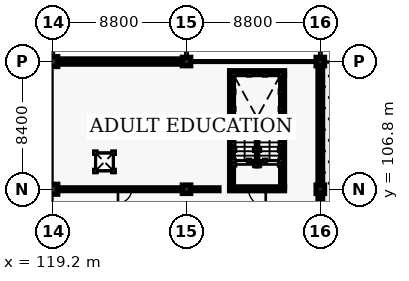
"""IFC4 building model, lengths in metres.
Left out: names, types, materials, properties, quantities, classifications, styles, units other than length and angle.
Written with IfcOpenShell. Run it as: python <this file> out.ifc"""

import sys

from ifc_helpers import new_model, si_unit, direction, frame, frame_2d, origin, origin_2d, place, context, subcontext, project, spatial, rectangle, extrude, element, fill, save


model = new_model("IFC4")
c1 = context("Model", 3, precision=1e-05, world=origin(), true_north=direction((0.0, 1.0)))
c2 = subcontext(c1, "Body", "Model", "MODEL_VIEW")
j1 = project(units=[si_unit("LENGTHUNIT", "METRE"), si_unit("PLANEANGLEUNIT", "RADIAN")], contexts=[c1])
p1 = place(None, origin())
s1 = spatial("IfcSite", under=j1, at=p1, CompositionType="ELEMENT")
p2 = place(p1, origin())
s2 = spatial("IfcBuilding", under=s1, at=p2, CompositionType="ELEMENT")
p3 = place(p2, frame((0.0, 0.0, 9.0)))
s3 = spatial("IfcBuildingStorey", under=s2, at=p3, CompositionType="ELEMENT", Elevation=9.0)
for number, where, z_axis, x_axis in (
    (1, (119.2, 106.8, 0.0), (0.0, 0.0, 1.0), (1.0, 0.0, 0.0)),
    (2, (119.2, 115.2, 0.0), (0.0, 0.0, 1.0), (1.0, 0.0, 0.0)),
):
    element("IfcColumn", number, at=place(p3, frame(where, z_axis=z_axis, x_axis=x_axis)), inside=s3, PredefinedType="COLUMN", context=c2, shape_type="SweptSolid", body=[
        extrude(rectangle(XDim=0.65, YDim=0.65, at=origin_2d()), origin(), (0.0, 0.0, 1.0), 3.9),
    ])
for number, where, z_axis, x_axis in (
    (3, (128.0, 106.8, 0.0), (0.0, 0.0, 1.0), (1.0, 0.0, 0.0)),
    (4, (128.0, 115.2, 0.0), (0.0, 0.0, 1.0), (1.0, 0.0, 0.0)),
    (5, (136.8, 106.8, 0.0), (0.0, 0.0, 1.0), (1.0, 0.0, 0.0)),
    (6, (136.8, 115.2, 0.0), (0.0, 0.0, 1.0), (1.0, 0.0, 0.0)),
):
    element("IfcColumn", number, at=place(p3, frame(where, z_axis=z_axis, x_axis=x_axis)), inside=s3, PredefinedType="COLUMN", context=c2, shape_type="SweptSolid", body=[
        extrude(rectangle(XDim=0.55, YDim=0.55, at=origin_2d()), origin(), (0.0, 0.0, 1.0), 3.9),
    ])
p4 = place(p3, frame((119.3, 115.2, 0.0), z_axis=(0.0, 0.0, 1.0), x_axis=(1.0, 0.0, 0.0)))
e7 = element("IfcWall", 7, at=p4, inside=s3, PredefinedType="SOLIDWALL", context=c2, shape_type="SweptSolid", body=[
    extrude(rectangle(XDim=8.6, YDim=0.34, at=frame_2d((4.3, 0.0))), origin(), (0.0, 0.0, 1.0), 2.845),
])
p5 = place(p3, frame((136.8, 98.5, 0.0), z_axis=(0.0, 0.0, 1.0), x_axis=(0.0, 1.0, 0.0)))
e8 = element("IfcWall", 8, at=p5, inside=s3, PredefinedType="SOLIDWALL", context=c2, shape_type="SweptSolid", body=[
    extrude(rectangle(XDim=8.2, YDim=0.3, at=frame_2d((4.1, 0.0))), origin(), (0.0, 0.0, 1.0), 3.195),
])
p6 = place(p3, frame((136.8, 106.9, 0.0), z_axis=(0.0, 0.0, 1.0), x_axis=(0.0, 1.0, 0.0)))
e9 = element("IfcWall", 9, at=p6, inside=s3, PredefinedType="SOLIDWALL", context=c2, shape_type="SweptSolid", body=[
    extrude(rectangle(XDim=8.2, YDim=0.3, at=frame_2d((4.1, 0.0))), origin(), (0.0, 0.0, 1.0), 3.195),
])
p7 = place(p3, frame((134.445, 106.83, 0.0), z_axis=(0.0, 0.0, 1.0), x_axis=(-1.0, 0.0, 0.0)))
e10 = element("IfcWall", 10, at=p7, inside=s3, PredefinedType="SHEAR", context=c2, shape_type="SweptSolid", body=[
    extrude(rectangle(XDim=3.61, YDim=0.25, at=frame_2d((1.805, 0.0))), origin(), (0.0, 0.0, 1.0), 3.66),
])
p8 = place(p7, frame((1.235, 0.0, 0.0)))
e11 = element("IfcOpeningElement", 11, at=p8, cuts=e10, PredefinedType="OPENING", context=c2, shape_type="SweptSolid", body=[
    extrude(rectangle(XDim=1.14, YDim=2.15, at=frame_2d((0.57, 1.075))), frame((0.0, 0.135, 0.0), z_axis=(0.0, -1.0, 0.0), x_axis=(1.0, 0.0, 0.0)), (0.0, 0.0, 1.0), 0.27),
])
p9 = place(p3, frame((130.835, 114.47, 0.0), z_axis=(0.0, 0.0, 1.0), x_axis=(1.0, 0.0, 0.0)))
e12 = element("IfcWall", 12, at=p9, inside=s3, PredefinedType="SHEAR", context=c2, shape_type="SweptSolid", body=[
    extrude(rectangle(XDim=3.61, YDim=0.25, at=frame_2d((1.805, 0.0))), origin(), (0.0, 0.0, 1.0), 3.66),
])
for number, where, z_axis, x_axis in (
    (13, (130.96, 106.955, 0.0), (0.0, 0.0, 1.0), (0.0, 1.0, 0.0)),
    (14, (134.32, 114.345, 0.0), (0.0, 0.0, 1.0), (0.0, -1.0, 0.0)),
):
    element("IfcWall", number, at=place(p3, frame(where, z_axis=z_axis, x_axis=x_axis)), inside=s3, PredefinedType="SHEAR", context=c2, shape_type="SweptSolid", body=[
        extrude(rectangle(XDim=7.39, YDim=0.25, at=frame_2d((3.695, 0.0))), origin(), (0.0, 0.0, 1.0), 3.66),
    ])
p10 = place(p3, frame((117.75, 106.8, 0.0), z_axis=(0.0, 0.0, 1.0), x_axis=(1.0, 0.0, 0.0)))
e15 = element("IfcWall", 15, at=p10, inside=s3, PredefinedType="PARTITIONING", context=c2, shape_type="SweptSolid", body=[
    extrude(rectangle(XDim=12.38, YDim=0.18, at=frame_2d((6.19, 0.0))), origin(), (0.0, 0.0, 1.0), 2.845),
])
p11 = place(p10, frame((5.74, 0.0, 0.0)))
e16 = element("IfcOpeningElement", 16, at=p11, cuts=e15, PredefinedType="OPENING", context=c2, shape_type="SweptSolid", body=[
    extrude(rectangle(XDim=0.9, YDim=2.06, at=frame_2d((0.45, 1.03))), frame((0.0, 0.1, 0.0), z_axis=(0.0, -1.0, 0.0), x_axis=(1.0, 0.0, 0.0)), (0.0, 0.0, 1.0), 0.2),
])
p12 = place(p8, origin())
e17 = element("IfcDoor", 17, at=p12, inside=s3, OperationType="SINGLE_SWING_LEFT", PredefinedType="DOOR", context=c2, shape_type="SweptSolid", body=[
    extrude(rectangle(XDim=1.14, YDim=2.15, at=frame_2d((0.57, 1.075))), frame((0.0, 0.025, 0.0), z_axis=(0.0, -1.0, 0.0), x_axis=(1.0, 0.0, 0.0)), (0.0, 0.0, 1.0), 0.05),
])
fill(e11, e17)
p13 = place(p11, origin())
e18 = element("IfcDoor", 18, at=p13, inside=s3, OperationType="SINGLE_SWING_RIGHT", PredefinedType="DOOR", context=c2, shape_type="SweptSolid", body=[
    extrude(rectangle(XDim=0.9, YDim=2.06, at=frame_2d((0.45, 1.03))), frame((0.0, 0.025, 0.0), z_axis=(0.0, -1.0, 0.0), x_axis=(1.0, 0.0, 0.0)), (0.0, 0.0, 1.0), 0.05),
])
fill(e16, e18)
save(model, sys.argv[1])
